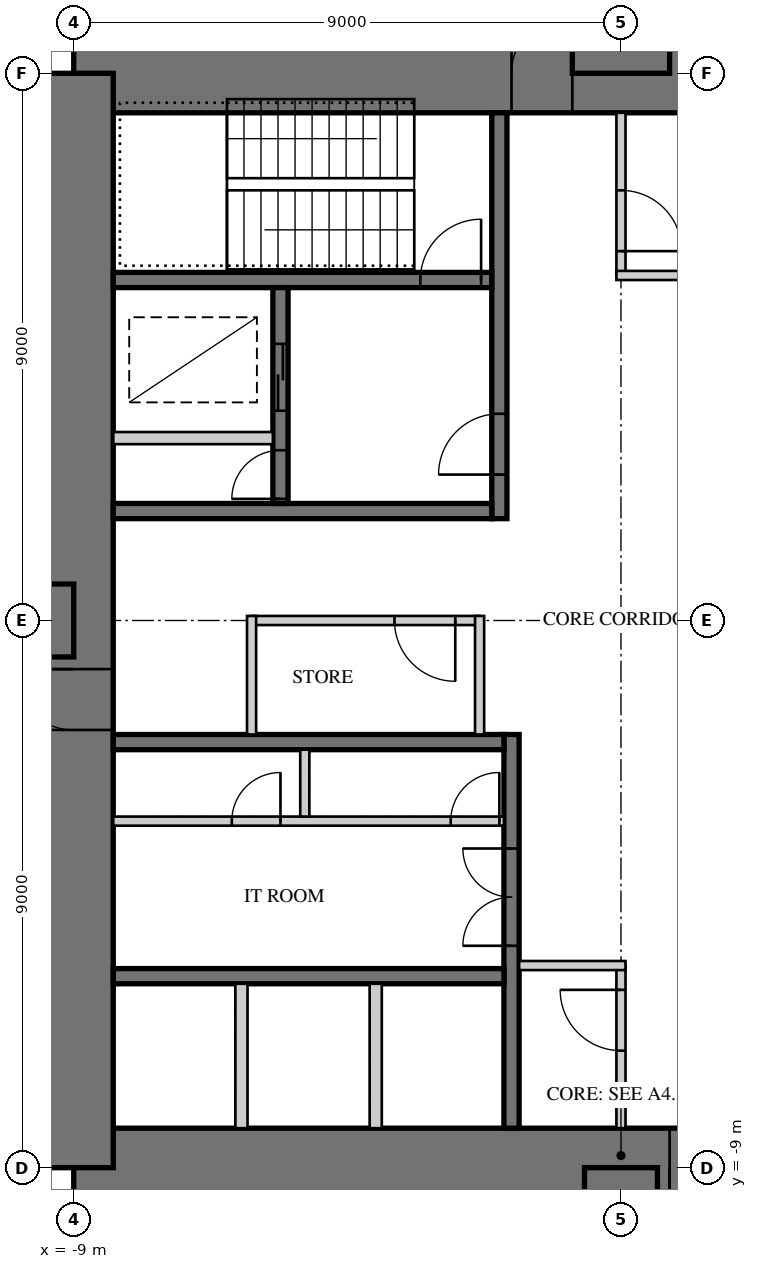
"""IFC4 building model, lengths in metres.
Left out: names, types, materials, properties, quantities, classifications, styles, units other than length and angle.
Written with IfcOpenShell. Run it as: python <this file> out.ifc"""

import sys

from ifc_helpers import new_model, si_unit, direction, frame, frame_2d, origin, place, context, subcontext, project, spatial, rectangle, extrude, element, fill, save


model = new_model("IFC4")
c1 = context("Model", 3, precision=1e-05, world=origin(), true_north=direction((0.0, 1.0)))
c2 = subcontext(c1, "Body", "Model", "MODEL_VIEW")
j1 = project(units=[si_unit("LENGTHUNIT", "METRE"), si_unit("PLANEANGLEUNIT", "RADIAN")], contexts=[c1])
p1 = place(None, origin())
s1 = spatial("IfcSite", under=j1, at=p1, CompositionType="ELEMENT")
p2 = place(p1, origin())
s2 = spatial("IfcBuilding", under=s1, at=p2, CompositionType="ELEMENT")
p3 = place(p2, frame((0.0, 0.0, 59.5)))
s3 = spatial("IfcBuildingStorey", under=s2, at=p3, CompositionType="ELEMENT", Elevation=59.5)
p4 = place(p3, frame((9.0, 9.0, 0.0), z_axis=(0.0, 0.0, 1.0), x_axis=(-1.0, 0.0, 0.0)))
e1 = element("IfcWall", 1, at=p4, inside=s3, PredefinedType="SHEAR", context=c2, shape_type="SweptSolid", body=[
    extrude(rectangle(XDim=18.0, YDim=1.3, at=frame_2d((9.0, 0.0))), origin(), (0.0, 0.0, 1.0), 4.0),
])
p5 = place(p4, frame((9.8, 0.0, 0.0)))
e2 = element("IfcOpeningElement", 2, at=p5, cuts=e1, PredefinedType="OPENING", context=c2, shape_type="SweptSolid", body=[
    extrude(rectangle(XDim=1.0, YDim=2.4, at=frame_2d((0.5, 1.2))), frame((0.0, 0.66, 0.0), z_axis=(0.0, -1.0, 0.0), x_axis=(1.0, 0.0, 0.0)), (0.0, 0.0, 1.0), 1.32),
])
p6 = place(p3, frame((-9.0, -9.0, 0.0), z_axis=(0.0, 0.0, 1.0), x_axis=(1.0, 0.0, 0.0)))
e3 = element("IfcWall", 3, at=p6, inside=s3, PredefinedType="SHEAR", context=c2, shape_type="SweptSolid", body=[
    extrude(rectangle(XDim=18.0, YDim=1.3, at=frame_2d((9.0, 0.0))), origin(), (0.0, 0.0, 1.0), 4.0),
])
p7 = place(p6, frame((9.8, 0.0, 0.0)))
e4 = element("IfcOpeningElement", 4, at=p7, cuts=e3, PredefinedType="OPENING", context=c2, shape_type="SweptSolid", body=[
    extrude(rectangle(XDim=1.0, YDim=2.4, at=frame_2d((0.5, 1.2))), frame((0.0, 0.66, 0.0), z_axis=(0.0, -1.0, 0.0), x_axis=(1.0, 0.0, 0.0)), (0.0, 0.0, 1.0), 1.32),
])
p8 = place(p3, frame((-9.0, 9.0, 0.0), z_axis=(0.0, 0.0, 1.0), x_axis=(0.0, -1.0, 0.0)))
e5 = element("IfcWall", 5, at=p8, inside=s3, PredefinedType="SHEAR", context=c2, shape_type="SweptSolid", body=[
    extrude(rectangle(XDim=18.0, YDim=1.3, at=frame_2d((9.0, 0.0))), origin(), (0.0, 0.0, 1.0), 4.0),
])
p9 = place(p8, frame((9.8, 0.0, 0.0)))
e6 = element("IfcOpeningElement", 6, at=p9, cuts=e5, PredefinedType="OPENING", context=c2, shape_type="SweptSolid", body=[
    extrude(rectangle(XDim=1.0, YDim=2.4, at=frame_2d((0.5, 1.2))), frame((0.0, 0.66, 0.0), z_axis=(0.0, -1.0, 0.0), x_axis=(1.0, 0.0, 0.0)), (0.0, 0.0, 1.0), 1.32),
])
p10 = place(p3, frame((-2.0, 1.675, 0.0), z_axis=(0.0, 0.0, 1.0), x_axis=(0.0, 1.0, 0.0)))
e7 = element("IfcWall", 7, at=p10, inside=s3, PredefinedType="SHEAR", context=c2, shape_type="SweptSolid", body=[
    extrude(rectangle(XDim=6.675, YDim=0.25, at=frame_2d((3.337, 0.0))), origin(), (0.0, 0.0, 1.0), 4.0),
])
p11 = place(p10, frame((0.725, 0.0, 0.0)))
e8 = element("IfcOpeningElement", 8, at=p11, cuts=e7, PredefinedType="OPENING", context=c2, shape_type="SweptSolid", body=[
    extrude(rectangle(XDim=1.0, YDim=2.1, at=frame_2d((0.5, 1.05))), frame((0.0, 0.135, 0.0), z_axis=(0.0, -1.0, 0.0), x_axis=(1.0, 0.0, 0.0)), (0.0, 0.0, 1.0), 0.27),
])
p12 = place(p3, frame((-2.125, 1.8, 0.0), z_axis=(0.0, 0.0, 1.0), x_axis=(-1.0, 0.0, 0.0)))
e9 = element("IfcWall", 9, at=p12, inside=s3, PredefinedType="SHEAR", context=c2, shape_type="SweptSolid", body=[
    extrude(rectangle(XDim=6.225, YDim=0.25, at=frame_2d((3.113, 0.0))), origin(), (0.0, 0.0, 1.0), 4.0),
])
p13 = place(p3, frame((-2.125, 5.6, 0.0), z_axis=(0.0, 0.0, 1.0), x_axis=(-1.0, 0.0, 0.0)))
e10 = element("IfcWall", 10, at=p13, inside=s3, PredefinedType="SHEAR", context=c2, shape_type="SweptSolid", body=[
    extrude(rectangle(XDim=6.225, YDim=0.25, at=frame_2d((3.113, 0.0))), origin(), (0.0, 0.0, 1.0), 4.0),
])
p14 = place(p13, frame((0.175, 0.0, 0.0)))
e11 = element("IfcOpeningElement", 11, at=p14, cuts=e10, PredefinedType="OPENING", context=c2, shape_type="SweptSolid", body=[
    extrude(rectangle(XDim=1.0, YDim=2.1, at=frame_2d((0.5, 1.05))), frame((0.0, 0.135, 0.0), z_axis=(0.0, -1.0, 0.0), x_axis=(1.0, 0.0, 0.0)), (0.0, 0.0, 1.0), 0.27),
])
p15 = place(p3, frame((-5.6, 1.925, 0.0), z_axis=(0.0, 0.0, 1.0), x_axis=(0.0, 1.0, 0.0)))
e12 = element("IfcWall", 12, at=p15, inside=s3, PredefinedType="SHEAR", context=c2, shape_type="SweptSolid", body=[
    extrude(rectangle(XDim=3.55, YDim=0.25, at=frame_2d((1.775, 0.0))), origin(), (0.0, 0.0, 1.0), 4.0),
])
p16 = place(p15, frame((1.525, 0.0, 0.0)))
e13 = element("IfcOpeningElement", 13, at=p16, cuts=e12, PredefinedType="OPENING", context=c2, shape_type="SweptSolid", body=[
    extrude(rectangle(XDim=1.1, YDim=2.2, at=frame_2d((0.55, 1.1))), frame((0.0, 0.135, 0.0), z_axis=(0.0, -1.0, 0.0), x_axis=(1.0, 0.0, 0.0)), (0.0, 0.0, 1.0), 0.27),
])
p17 = place(p15, frame((0.075, 0.0, 0.0)))
e14 = element("IfcOpeningElement", 14, at=p17, cuts=e12, PredefinedType="OPENING", context=c2, shape_type="SweptSolid", body=[
    extrude(rectangle(XDim=0.8, YDim=2.1, at=frame_2d((0.4, 1.05))), frame((0.0, 0.135, 0.0), z_axis=(0.0, -1.0, 0.0), x_axis=(1.0, 0.0, 0.0)), (0.0, 0.0, 1.0), 0.27),
])
p18 = place(p3, frame((-5.725, 3.0, 0.0), z_axis=(0.0, 0.0, 1.0), x_axis=(-1.0, 0.0, 0.0)))
e15 = element("IfcWall", 15, at=p18, inside=s3, PredefinedType="PARTITIONING", context=c2, shape_type="SweptSolid", body=[
    extrude(rectangle(XDim=2.625, YDim=0.2, at=frame_2d((1.312, 0.0))), origin(), (0.0, 0.0, 1.0), 4.0),
])
p19 = place(p3, frame((-1.8, -1.875, 0.0), z_axis=(0.0, 0.0, 1.0), x_axis=(0.0, -1.0, 0.0)))
e16 = element("IfcWall", 16, at=p19, inside=s3, PredefinedType="SHEAR", context=c2, shape_type="SweptSolid", body=[
    extrude(rectangle(XDim=6.475, YDim=0.25, at=frame_2d((3.238, 0.0))), origin(), (0.0, 0.0, 1.0), 4.0),
])
p20 = place(p19, frame((1.875, 0.0, 0.0)))
e17 = element("IfcOpeningElement", 17, at=p20, cuts=e16, PredefinedType="OPENING", context=c2, shape_type="SweptSolid", body=[
    extrude(rectangle(XDim=1.6, YDim=2.4, at=frame_2d((0.8, 1.2))), frame((0.0, 0.135, 0.0), z_axis=(0.0, -1.0, 0.0), x_axis=(1.0, 0.0, 0.0)), (0.0, 0.0, 1.0), 0.27),
])
for number, where, z_axis, x_axis in (
    (18, (-1.925, -2.0, 0.0), (0.0, 0.0, 1.0), (-1.0, 0.0, 0.0)),
    (19, (-1.925, -5.85, 0.0), (0.0, 0.0, 1.0), (-1.0, 0.0, 0.0)),
):
    element("IfcWall", number, at=place(p3, frame(where, z_axis=z_axis, x_axis=x_axis)), inside=s3, PredefinedType="SHEAR", context=c2, shape_type="SweptSolid", body=[
        extrude(rectangle(XDim=6.425, YDim=0.25, at=frame_2d((3.212, 0.0))), origin(), (0.0, 0.0, 1.0), 4.0),
    ])
p21 = place(p3, frame((-1.925, -3.3, 0.0), z_axis=(0.0, 0.0, 1.0), x_axis=(-1.0, 0.0, 0.0)))
e20 = element("IfcWall", 20, at=p21, inside=s3, PredefinedType="PARTITIONING", context=c2, shape_type="SweptSolid", body=[
    extrude(rectangle(XDim=6.425, YDim=0.15, at=frame_2d((3.212, 0.0))), origin(), (0.0, 0.0, 1.0), 4.0),
])
p22 = place(p21, frame((0.075, 0.0, 0.0)))
e21 = element("IfcOpeningElement", 21, at=p22, cuts=e20, PredefinedType="OPENING", context=c2, shape_type="SweptSolid", body=[
    extrude(rectangle(XDim=0.8, YDim=2.1, at=frame_2d((0.4, 1.05))), frame((0.0, 0.085, 0.0), z_axis=(0.0, -1.0, 0.0), x_axis=(1.0, 0.0, 0.0)), (0.0, 0.0, 1.0), 0.17),
])
p23 = place(p21, frame((3.675, 0.0, 0.0)))
e22 = element("IfcOpeningElement", 22, at=p23, cuts=e20, PredefinedType="OPENING", context=c2, shape_type="SweptSolid", body=[
    extrude(rectangle(XDim=0.8, YDim=2.1, at=frame_2d((0.4, 1.05))), frame((0.0, 0.085, 0.0), z_axis=(0.0, -1.0, 0.0), x_axis=(1.0, 0.0, 0.0)), (0.0, 0.0, 1.0), 0.17),
])
p24 = place(p3, frame((-5.2, -2.125, 0.0), z_axis=(0.0, 0.0, 1.0), x_axis=(0.0, -1.0, 0.0)))
e23 = element("IfcWall", 23, at=p24, inside=s3, PredefinedType="PARTITIONING", context=c2, shape_type="SweptSolid", body=[
    extrude(rectangle(XDim=1.1, YDim=0.15, at=frame_2d((0.55, 0.0))), origin(), (0.0, 0.0, 1.0), 4.0),
])
for number, where, z_axis, x_axis in (
    (24, (-4.033, -5.975, 0.0), (0.0, 0.0, 1.0), (0.0, -1.0, 0.0)),
    (25, (-6.242, -5.975, 0.0), (0.0, 0.0, 1.0), (0.0, -1.0, 0.0)),
):
    element("IfcWall", number, at=place(p3, frame(where, z_axis=z_axis, x_axis=x_axis)), inside=s3, PredefinedType="PARTITIONING", context=c2, shape_type="SweptSolid", body=[
        extrude(rectangle(XDim=2.375, YDim=0.2, at=frame_2d((1.188, 0.0))), origin(), (0.0, 0.0, 1.0), 4.0),
    ])
p25 = place(p3, frame((0.0, 9.0, 0.0), z_axis=(0.0, 0.0, 1.0), x_axis=(0.0, 1.0, 0.0)))
e26 = element("IfcWall", 26, at=p25, inside=s3, PredefinedType="SHEAR", context=c2, shape_type="SweptSolid", body=[
    extrude(rectangle(XDim=9.0, YDim=1.6, at=frame_2d((4.5, 0.0))), origin(), (0.0, 0.0, 1.0), 4.0),
])
p26 = place(p3, frame((0.0, -9.0, 0.0), z_axis=(0.0, 0.0, 1.0), x_axis=(0.0, -1.0, 0.0)))
e27 = element("IfcWall", 27, at=p26, inside=s3, PredefinedType="SHEAR", context=c2, shape_type="SweptSolid", body=[
    extrude(rectangle(XDim=18.0, YDim=1.2, at=frame_2d((9.0, 0.0))), origin(), (0.0, 0.0, 1.0), 4.0),
])
p27 = place(p26, frame((9.9, 0.0, 0.0)))
e28 = element("IfcOpeningElement", 28, at=p27, cuts=e27, PredefinedType="OPENING", context=c2, shape_type="SweptSolid", body=[
    extrude(rectangle(XDim=1.0, YDim=2.2, at=frame_2d((0.5, 1.1))), frame((0.0, 0.61, 0.0), z_axis=(0.0, -1.0, 0.0), x_axis=(1.0, 0.0, 0.0)), (0.0, 0.0, 1.0), 1.22),
])
p28 = place(p3, frame((-9.0, 0.0, 0.0), z_axis=(0.0, 0.0, 1.0), x_axis=(-1.0, 0.0, 0.0)))
e29 = element("IfcWall", 29, at=p28, inside=s3, PredefinedType="SHEAR", context=c2, shape_type="SweptSolid", body=[
    extrude(rectangle(XDim=18.0, YDim=1.2, at=frame_2d((9.0, 0.0))), origin(), (0.0, 0.0, 1.0), 4.0),
])
p29 = place(p28, frame((9.9, 0.0, 0.0)))
e30 = element("IfcOpeningElement", 30, at=p29, cuts=e29, PredefinedType="OPENING", context=c2, shape_type="SweptSolid", body=[
    extrude(rectangle(XDim=1.0, YDim=2.2, at=frame_2d((0.5, 1.1))), frame((0.0, 0.61, 0.0), z_axis=(0.0, -1.0, 0.0), x_axis=(1.0, 0.0, 0.0)), (0.0, 0.0, 1.0), 1.22),
])
p30 = place(p3, frame((-2.325, 0.0, 0.0), z_axis=(0.0, 0.0, 1.0), x_axis=(-1.0, 0.0, 0.0)))
e31 = element("IfcWall", 31, at=p30, inside=s3, PredefinedType="PARTITIONING", context=c2, shape_type="SweptSolid", body=[
    extrude(rectangle(XDim=3.75, YDim=0.15, at=frame_2d((1.875, 0.0))), origin(), (0.0, 0.0, 1.0), 3.8),
])
p31 = place(p30, frame((0.4, 0.0, 0.0)))
e32 = element("IfcOpeningElement", 32, at=p31, cuts=e31, PredefinedType="OPENING", context=c2, shape_type="SweptSolid", body=[
    extrude(rectangle(XDim=1.0, YDim=2.1, at=frame_2d((0.5, 1.05))), frame((0.0, 0.085, 0.0), z_axis=(0.0, -1.0, 0.0), x_axis=(1.0, 0.0, 0.0)), (0.0, 0.0, 1.0), 0.17),
])
for number, where, z_axis, x_axis in (
    (33, (-2.325, -1.875, 0.0), (0.0, 0.0, 1.0), (0.0, 1.0, 0.0)),
    (34, (-6.075, 0.075, 0.0), (0.0, 0.0, 1.0), (0.0, -1.0, 0.0)),
):
    element("IfcWall", number, at=place(p3, frame(where, z_axis=z_axis, x_axis=x_axis)), inside=s3, PredefinedType="PARTITIONING", context=c2, shape_type="SweptSolid", body=[
        extrude(rectangle(XDim=1.95, YDim=0.15, at=frame_2d((0.975, 0.0))), origin(), (0.0, 0.0, 1.0), 3.8),
    ])
p32 = place(p3, frame((0.0, 5.675, 0.0), z_axis=(0.0, 0.0, 1.0), x_axis=(0.0, 1.0, 0.0)))
e35 = element("IfcWall", 35, at=p32, inside=s3, PredefinedType="PARTITIONING", context=c2, shape_type="SweptSolid", body=[
    extrude(rectangle(XDim=2.675, YDim=0.15, at=frame_2d((1.337, 0.0))), origin(), (0.0, 0.0, 1.0), 3.8),
])
p33 = place(p32, frame((0.4, 0.0, 0.0)))
e36 = element("IfcOpeningElement", 36, at=p33, cuts=e35, PredefinedType="OPENING", context=c2, shape_type="SweptSolid", body=[
    extrude(rectangle(XDim=1.0, YDim=2.1, at=frame_2d((0.5, 1.05))), frame((0.0, 0.085, 0.0), z_axis=(0.0, -1.0, 0.0), x_axis=(1.0, 0.0, 0.0)), (0.0, 0.0, 1.0), 0.17),
])
p34 = place(p3, frame((1.675, 5.675, 0.0), z_axis=(0.0, 0.0, 1.0), x_axis=(-1.0, 0.0, 0.0)))
e37 = element("IfcWall", 37, at=p34, inside=s3, PredefinedType="PARTITIONING", context=c2, shape_type="SweptSolid", body=[
    extrude(rectangle(XDim=1.75, YDim=0.15, at=frame_2d((0.875, 0.0))), origin(), (0.0, 0.0, 1.0), 3.8),
])
p35 = place(p3, frame((0.0, -5.675, 0.0), z_axis=(0.0, 0.0, 1.0), x_axis=(0.0, -1.0, 0.0)))
e38 = element("IfcWall", 38, at=p35, inside=s3, PredefinedType="PARTITIONING", context=c2, shape_type="SweptSolid", body=[
    extrude(rectangle(XDim=2.675, YDim=0.15, at=frame_2d((1.337, 0.0))), origin(), (0.0, 0.0, 1.0), 3.8),
])
p36 = place(p35, frame((0.4, 0.0, 0.0)))
e39 = element("IfcOpeningElement", 39, at=p36, cuts=e38, PredefinedType="OPENING", context=c2, shape_type="SweptSolid", body=[
    extrude(rectangle(XDim=1.0, YDim=2.1, at=frame_2d((0.5, 1.05))), frame((0.0, 0.085, 0.0), z_axis=(0.0, -1.0, 0.0), x_axis=(1.0, 0.0, 0.0)), (0.0, 0.0, 1.0), 0.17),
])
p37 = place(p3, frame((-1.675, -5.675, 0.0), z_axis=(0.0, 0.0, 1.0), x_axis=(1.0, 0.0, 0.0)))
e40 = element("IfcWall", 40, at=p37, inside=s3, PredefinedType="PARTITIONING", context=c2, shape_type="SweptSolid", body=[
    extrude(rectangle(XDim=1.75, YDim=0.15, at=frame_2d((0.875, 0.0))), origin(), (0.0, 0.0, 1.0), 3.8),
])
p38 = place(p31, origin())
e41 = element("IfcDoor", 41, at=p38, inside=s3, OperationType="SINGLE_SWING_LEFT", PredefinedType="DOOR", context=c2, shape_type="SweptSolid", body=[
    extrude(rectangle(XDim=1.0, YDim=2.1, at=frame_2d((0.5, 1.05))), frame((0.0, 0.025, 0.0), z_axis=(0.0, -1.0, 0.0), x_axis=(1.0, 0.0, 0.0)), (0.0, 0.0, 1.0), 0.05),
])
fill(e32, e41)
p39 = place(p33, frame((1.0, 0.0, 0.0), z_axis=(0.0, 0.0, 1.0), x_axis=(-1.0, 0.0, 0.0)))
e42 = element("IfcDoor", 42, at=p39, inside=s3, OperationType="SINGLE_SWING_RIGHT", PredefinedType="DOOR", context=c2, shape_type="SweptSolid", body=[
    extrude(rectangle(XDim=1.0, YDim=2.1, at=frame_2d((0.5, 1.05))), frame((0.0, 0.025, 0.0), z_axis=(0.0, -1.0, 0.0), x_axis=(1.0, 0.0, 0.0)), (0.0, 0.0, 1.0), 0.05),
])
fill(e36, e42)
p40 = place(p36, frame((1.0, 0.0, 0.0), z_axis=(0.0, 0.0, 1.0), x_axis=(-1.0, 0.0, 0.0)))
e43 = element("IfcDoor", 43, at=p40, inside=s3, OperationType="SINGLE_SWING_RIGHT", PredefinedType="DOOR", context=c2, shape_type="SweptSolid", body=[
    extrude(rectangle(XDim=1.0, YDim=2.1, at=frame_2d((0.5, 1.05))), frame((0.0, 0.025, 0.0), z_axis=(0.0, -1.0, 0.0), x_axis=(1.0, 0.0, 0.0)), (0.0, 0.0, 1.0), 0.05),
])
fill(e39, e43)
p41 = place(p5, frame((1.0, 0.0, 0.0), z_axis=(0.0, 0.0, 1.0), x_axis=(-1.0, 0.0, 0.0)))
e44 = element("IfcDoor", 44, at=p41, inside=s3, OperationType="SINGLE_SWING_RIGHT", PredefinedType="DOOR", context=c2, shape_type="SweptSolid", body=[
    extrude(rectangle(XDim=1.0, YDim=2.4, at=frame_2d((0.5, 1.2))), frame((0.0, -0.005, 0.0), z_axis=(0.0, -1.0, 0.0), x_axis=(1.0, 0.0, 0.0)), (0.0, 0.0, 1.0), 0.05),
])
fill(e2, e44)
p42 = place(p7, frame((1.0, 0.0, 0.0), z_axis=(0.0, 0.0, 1.0), x_axis=(-1.0, 0.0, 0.0)))
e45 = element("IfcDoor", 45, at=p42, inside=s3, OperationType="SINGLE_SWING_RIGHT", PredefinedType="DOOR", context=c2, shape_type="SweptSolid", body=[
    extrude(rectangle(XDim=1.0, YDim=2.4, at=frame_2d((0.5, 1.2))), frame((0.0, -0.005, 0.0), z_axis=(0.0, -1.0, 0.0), x_axis=(1.0, 0.0, 0.0)), (0.0, 0.0, 1.0), 0.05),
])
fill(e4, e45)
p43 = place(p9, frame((1.0, 0.0, 0.0), z_axis=(0.0, 0.0, 1.0), x_axis=(-1.0, 0.0, 0.0)))
e46 = element("IfcDoor", 46, at=p43, inside=s3, OperationType="SINGLE_SWING_RIGHT", PredefinedType="DOOR", context=c2, shape_type="SweptSolid", body=[
    extrude(rectangle(XDim=1.0, YDim=2.4, at=frame_2d((0.5, 1.2))), frame((0.0, -0.005, 0.0), z_axis=(0.0, -1.0, 0.0), x_axis=(1.0, 0.0, 0.0)), (0.0, 0.0, 1.0), 0.05),
])
fill(e6, e46)
p44 = place(p11, origin())
e47 = element("IfcDoor", 47, at=p44, inside=s3, OperationType="SINGLE_SWING_LEFT", PredefinedType="DOOR", context=c2, shape_type="SweptSolid", body=[
    extrude(rectangle(XDim=1.0, YDim=2.1, at=frame_2d((0.5, 1.05))), frame((0.0, 0.025, 0.0), z_axis=(0.0, -1.0, 0.0), x_axis=(1.0, 0.0, 0.0)), (0.0, 0.0, 1.0), 0.05),
])
fill(e8, e47)
p45 = place(p14, frame((1.0, 0.0, 0.0), z_axis=(0.0, 0.0, 1.0), x_axis=(-1.0, 0.0, 0.0)))
e48 = element("IfcDoor", 48, at=p45, inside=s3, OperationType="SINGLE_SWING_RIGHT", PredefinedType="DOOR", context=c2, shape_type="SweptSolid", body=[
    extrude(rectangle(XDim=1.0, YDim=2.1, at=frame_2d((0.5, 1.05))), frame((0.0, 0.025, 0.0), z_axis=(0.0, -1.0, 0.0), x_axis=(1.0, 0.0, 0.0)), (0.0, 0.0, 1.0), 0.05),
])
fill(e11, e48)
p46 = place(p16, origin())
e49 = element("IfcDoor", 49, at=p46, inside=s3, OperationType="DOUBLE_DOOR_SLIDING", PredefinedType="DOOR", context=c2, shape_type="SweptSolid", body=[
    extrude(rectangle(XDim=1.1, YDim=2.2, at=frame_2d((0.55, 1.1))), frame((0.0, 0.025, 0.0), z_axis=(0.0, -1.0, 0.0), x_axis=(1.0, 0.0, 0.0)), (0.0, 0.0, 1.0), 0.05),
])
fill(e13, e49)
p47 = place(p17, origin())
e50 = element("IfcDoor", 50, at=p47, inside=s3, OperationType="SINGLE_SWING_LEFT", PredefinedType="DOOR", context=c2, shape_type="SweptSolid", body=[
    extrude(rectangle(XDim=0.8, YDim=2.1, at=frame_2d((0.4, 1.05))), frame((0.0, 0.025, 0.0), z_axis=(0.0, -1.0, 0.0), x_axis=(1.0, 0.0, 0.0)), (0.0, 0.0, 1.0), 0.05),
])
fill(e14, e50)
p48 = place(p20, frame((1.6, 0.0, 0.0), z_axis=(0.0, 0.0, 1.0), x_axis=(-1.0, 0.0, 0.0)))
e51 = element("IfcDoor", 51, at=p48, inside=s3, OperationType="DOUBLE_DOOR_SINGLE_SWING", PredefinedType="DOOR", context=c2, shape_type="SweptSolid", body=[
    extrude(rectangle(XDim=1.6, YDim=2.4, at=frame_2d((0.8, 1.2))), frame((0.0, 0.025, 0.0), z_axis=(0.0, -1.0, 0.0), x_axis=(1.0, 0.0, 0.0)), (0.0, 0.0, 1.0), 0.05),
])
fill(e17, e51)
p49 = place(p22, frame((0.8, 0.0, 0.0), z_axis=(0.0, 0.0, 1.0), x_axis=(-1.0, 0.0, 0.0)))
e52 = element("IfcDoor", 52, at=p49, inside=s3, OperationType="SINGLE_SWING_RIGHT", PredefinedType="DOOR", context=c2, shape_type="SweptSolid", body=[
    extrude(rectangle(XDim=0.8, YDim=2.1, at=frame_2d((0.4, 1.05))), frame((0.0, 0.025, 0.0), z_axis=(0.0, -1.0, 0.0), x_axis=(1.0, 0.0, 0.0)), (0.0, 0.0, 1.0), 0.05),
])
fill(e21, e52)
p50 = place(p23, frame((0.8, 0.0, 0.0), z_axis=(0.0, 0.0, 1.0), x_axis=(-1.0, 0.0, 0.0)))
e53 = element("IfcDoor", 53, at=p50, inside=s3, OperationType="SINGLE_SWING_RIGHT", PredefinedType="DOOR", context=c2, shape_type="SweptSolid", body=[
    extrude(rectangle(XDim=0.8, YDim=2.1, at=frame_2d((0.4, 1.05))), frame((0.0, 0.025, 0.0), z_axis=(0.0, -1.0, 0.0), x_axis=(1.0, 0.0, 0.0)), (0.0, 0.0, 1.0), 0.05),
])
fill(e22, e53)
save(model, sys.argv[1])
